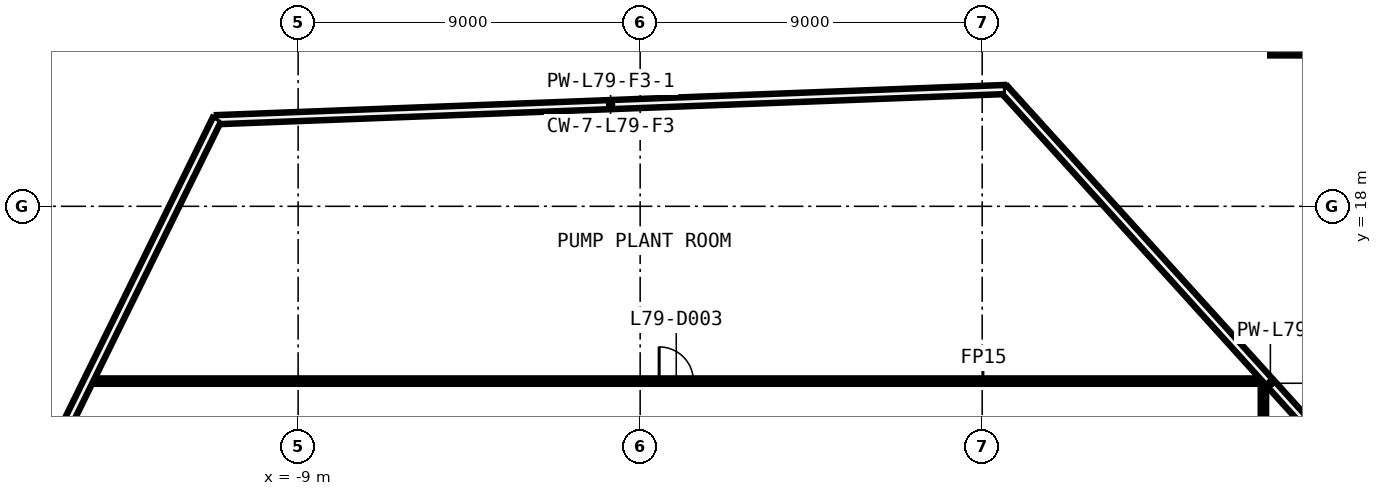
"""IFC4 building model, lengths in metres.
Left out: names, types, materials, properties, quantities, classifications, styles, units other than length and angle.
Written with IfcOpenShell. Run it as: python <this file> out.ifc"""

import sys

from ifc_helpers import new_model, si_unit, direction, frame, frame_2d, origin, origin_2d, place, context, subcontext, project, spatial, rectangle, hollow_rectangle, extrude, element, fill, save


model = new_model("IFC4")
c1 = context("Model", 3, precision=1e-05, world=origin(), true_north=direction((0.0, 1.0)))
c2 = subcontext(c1, "Body", "Model", "MODEL_VIEW")
j1 = project(units=[si_unit("LENGTHUNIT", "METRE"), si_unit("PLANEANGLEUNIT", "RADIAN")], contexts=[c1])
p1 = place(None, origin())
s1 = spatial("IfcSite", under=j1, at=p1, CompositionType="ELEMENT")
p2 = place(p1, origin())
s2 = spatial("IfcBuilding", under=s1, at=p2, CompositionType="ELEMENT")
p3 = place(p2, frame((0.0, 0.0, 367.4)))
s3 = spatial("IfcBuildingStorey", under=s2, at=p3, CompositionType="ELEMENT", Elevation=367.4)
p4 = place(p3, frame((17.276, 22.666, 0.0), z_axis=(0.0, 0.0, 1.0), x_axis=(1.0, 0.0, 0.0)))
e1 = element("IfcColumn", 1, at=p4, inside=s3, PredefinedType="COLUMN", context=c2, shape_type="SweptSolid", body=[
    extrude(hollow_rectangle(XDim=1.4, YDim=1.4, WallThickness=0.06, at=origin_2d()), origin(), (0.0, 0.0, 1.0), 4.2),
])
p5 = place(p3, frame((-14.5, 13.4, 0.0), z_axis=(0.0, 0.0, 1.0), x_axis=(1.0, 0.0, 0.0)))
e2 = element("IfcWall", 2, at=p5, inside=s3, PredefinedType="PARTITIONING", context=c2, shape_type="SweptSolid", body=[
    extrude(rectangle(XDim=30.975, YDim=0.15, at=frame_2d((15.487, 0.0))), origin(), (0.0, 0.0, 1.0), 3.8),
])
p6 = place(p5, frame((15.0, 0.0, 0.0)))
e3 = element("IfcOpeningElement", 3, at=p6, cuts=e2, PredefinedType="OPENING", context=c2, shape_type="SweptSolid", body=[
    extrude(rectangle(XDim=0.9, YDim=2.1, at=frame_2d((0.45, 1.05))), frame((0.0, 0.085, 0.0), z_axis=(0.0, -1.0, 0.0), x_axis=(1.0, 0.0, 0.0)), (0.0, 0.0, 1.0), 0.17),
])
p7 = place(p3, frame((16.4, -9.676, 0.0), z_axis=(0.0, 0.0, 1.0), x_axis=(0.0, 1.0, 0.0)))
e4 = element("IfcWall", 4, at=p7, inside=s3, PredefinedType="PARTITIONING", context=c2, shape_type="SweptSolid", body=[
    extrude(rectangle(XDim=23.001, YDim=0.15, at=frame_2d((11.5, 0.0))), origin(), (0.0, 0.0, 1.0), 3.8),
])
p8 = place(p3, frame((23.583, 5.614, 0.0), z_axis=(0.0, 0.0, 1.0), x_axis=(-0.671256862452, 0.741224813812, 0.0)))
e5 = element("IfcWall", 5, at=p8, inside=s3, PredefinedType="SOLIDWALL", context=c2, shape_type="SweptSolid", body=[
    extrude(rectangle(XDim=20.856, YDim=0.25, at=frame_2d((10.428, 0.0))), origin(), (0.0, 0.0, 1.0), 3.8),
])
p9 = place(p3, frame((9.583, 21.073, 0.0), z_axis=(0.0, 0.0, 1.0), x_axis=(-0.999269048775, -0.038227845343, 0.0)))
e6 = element("IfcWall", 6, at=p9, inside=s3, PredefinedType="SOLIDWALL", context=c2, shape_type="SweptSolid", body=[
    extrude(rectangle(XDim=20.737, YDim=0.25, at=frame_2d((10.368, 0.0))), origin(), (0.0, 0.0, 1.0), 3.8),
])
p10 = place(p3, frame((-11.138, 20.28, 0.0), z_axis=(0.0, 0.0, 1.0), x_axis=(-0.441342255748, -0.897338850876, 0.0)))
e7 = element("IfcWall", 7, at=p10, inside=s3, PredefinedType="SOLIDWALL", context=c2, shape_type="SweptSolid", body=[
    extrude(rectangle(XDim=28.805, YDim=0.25, at=frame_2d((14.403, 0.0))), origin(), (0.0, 0.0, 1.0), 3.8),
])
p11 = place(p6, origin())
e8 = element("IfcDoor", 8, at=p11, inside=s3, OperationType="SINGLE_SWING_RIGHT", PredefinedType="DOOR", context=c2, shape_type="SweptSolid", body=[
    extrude(rectangle(XDim=0.9, YDim=2.1, at=frame_2d((0.45, 1.05))), frame((0.0, 0.025, 0.0), z_axis=(0.0, -1.0, 0.0), x_axis=(1.0, 0.0, 0.0)), (0.0, 0.0, 1.0), 0.05),
])
fill(e3, e8)
save(model, sys.argv[1])
